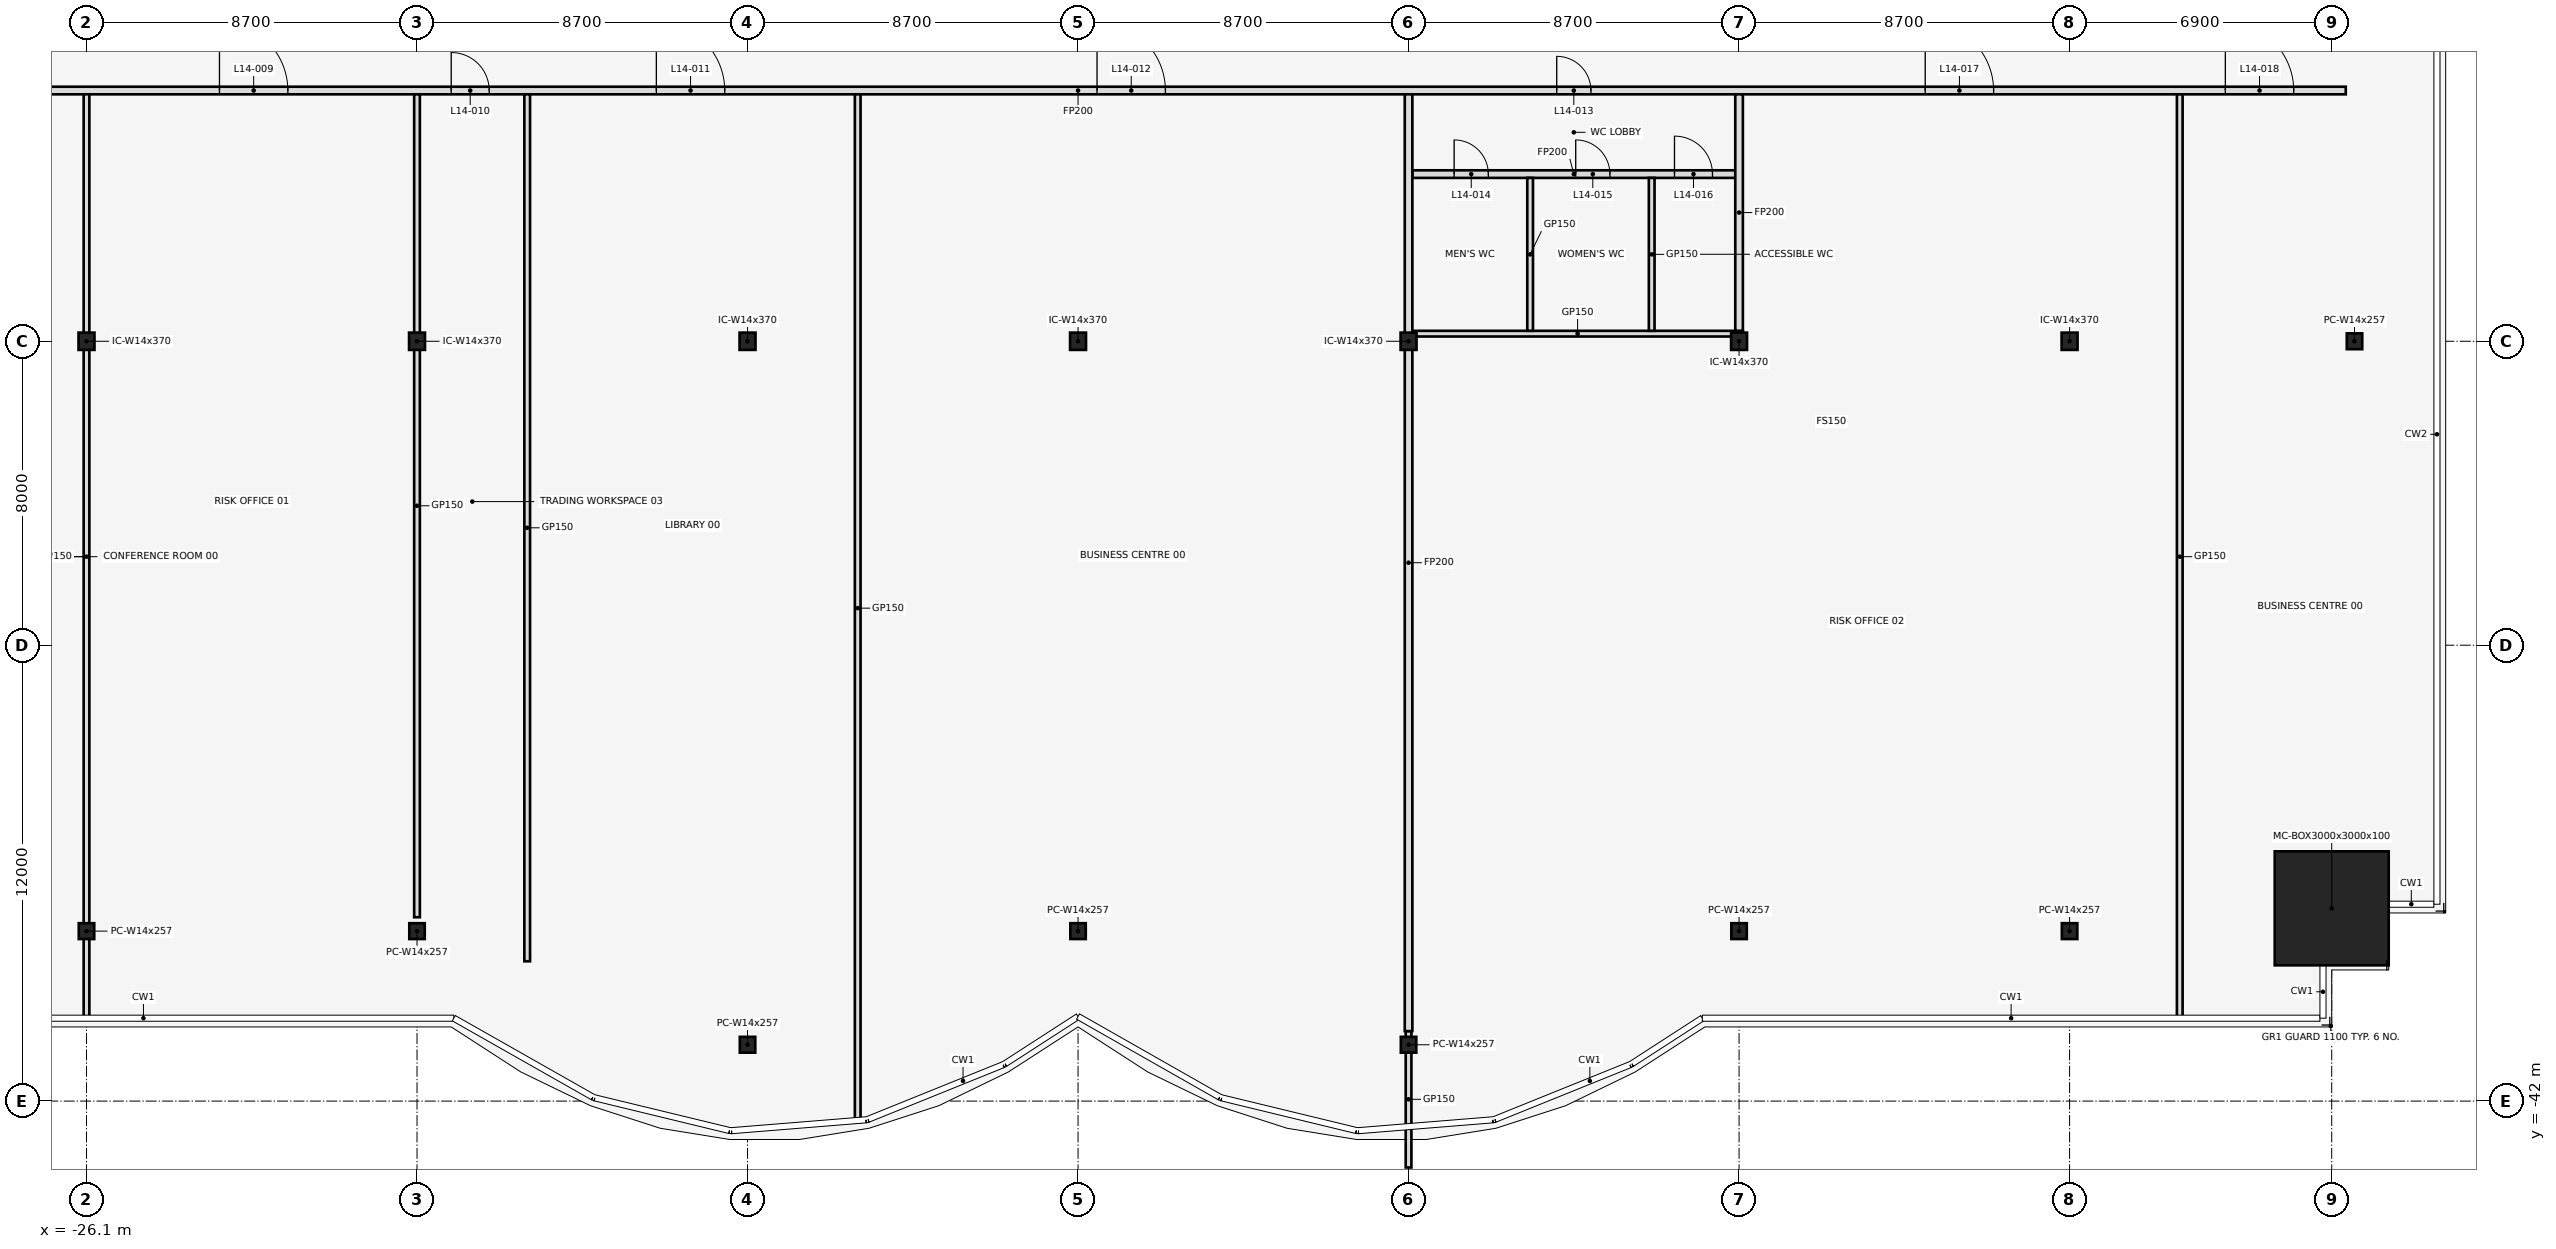
"""IFC4 building model, lengths in metres.
Left out: names, types, materials, properties, quantities, classifications, styles, units other than length and angle.
Written with IfcOpenShell. Run it as: python <this file> out.ifc"""

import sys

from ifc_helpers import new_model, si_unit, direction, frame, frame_2d, origin, origin_2d, place, context, subcontext, project, spatial, rectangle, hollow_rectangle, i_section, extrude, element, fill, save


model = new_model("IFC4")
c1 = context("Model", 3, precision=1e-05, world=origin(), true_north=direction((0.0, 1.0)))
c2 = subcontext(c1, "Body", "Model", "MODEL_VIEW")
j1 = project(units=[si_unit("LENGTHUNIT", "METRE"), si_unit("PLANEANGLEUNIT", "RADIAN")], contexts=[c1])
p1 = place(None, origin())
s1 = spatial("IfcSite", under=j1, at=p1, CompositionType="ELEMENT")
p2 = place(p1, origin())
s2 = spatial("IfcBuilding", under=s1, at=p2, CompositionType="ELEMENT")
p3 = place(p2, frame((0.0, 0.0, 71.0)))
s3 = spatial("IfcBuildingStorey", under=s2, at=p3, CompositionType="ELEMENT", Elevation=71.0)
for number, where, z_axis, x_axis in (
    (1, (-26.1, -37.526, 0.0), (0.0, 0.0, 1.0), (1.0, 0.0, 0.0)),
    (2, (-17.4, -37.526, 0.0), (0.0, 0.0, 1.0), (1.0, 0.0, 0.0)),
    (3, (-8.7, -40.517, 0.0), (0.0, 0.0, 1.0), (1.0, 0.0, 0.0)),
    (4, (0.0, -37.526, 0.0), (0.0, 0.0, 1.0), (1.0, 0.0, 0.0)),
    (5, (8.7, -40.517, 0.0), (0.0, 0.0, 1.0), (1.0, 0.0, 0.0)),
    (6, (17.4, -37.526, 0.0), (0.0, 0.0, 1.0), (1.0, 0.0, 0.0)),
    (7, (26.1, -37.526, 0.0), (0.0, 0.0, 1.0), (1.0, 0.0, 0.0)),
):
    element("IfcColumn", number, at=place(p3, frame(where, z_axis=z_axis, x_axis=x_axis)), inside=s3, PredefinedType="COLUMN", context=c2, shape_type="SweptSolid", body=[
        extrude(i_section(OverallWidth=0.406, OverallDepth=0.417, WebThickness=0.03, FlangeThickness=0.048, at=origin_2d()), origin(), (0.0, 0.0, 1.0), 4.5),
    ])
p4 = place(p3, frame((33.0, -36.926, 0.0), z_axis=(0.0, 0.0, 1.0), x_axis=(1.0, 0.0, 0.0)))
e8 = element("IfcColumn", 8, at=p4, inside=s3, PredefinedType="COLUMN", context=c2, shape_type="SweptSolid", body=[
    extrude(hollow_rectangle(XDim=3.0, YDim=3.0, WallThickness=0.1, at=origin_2d()), origin(), (0.0, 0.0, 1.0), 4.5),
])
p5 = place(p3, frame((33.6, -22.0, 0.0), z_axis=(0.0, 0.0, 1.0), x_axis=(1.0, 0.0, 0.0)))
e9 = element("IfcColumn", 9, at=p5, inside=s3, PredefinedType="COLUMN", context=c2, shape_type="SweptSolid", body=[
    extrude(i_section(OverallWidth=0.406, OverallDepth=0.417, WebThickness=0.03, FlangeThickness=0.048, at=origin_2d()), origin(), (0.0, 0.0, 1.0), 4.5),
])
for number, where, z_axis, x_axis in (
    (10, (-26.1, -22.0, 0.0), (0.0, 0.0, 1.0), (1.0, 0.0, 0.0)),
    (11, (-17.4, -22.0, 0.0), (0.0, 0.0, 1.0), (1.0, 0.0, 0.0)),
    (12, (-8.7, -22.0, 0.0), (0.0, 0.0, 1.0), (1.0, 0.0, 0.0)),
    (13, (0.0, -22.0, 0.0), (0.0, 0.0, 1.0), (1.0, 0.0, 0.0)),
    (14, (8.7, -22.0, 0.0), (0.0, 0.0, 1.0), (1.0, 0.0, 0.0)),
    (15, (17.4, -22.0, 0.0), (0.0, 0.0, 1.0), (1.0, 0.0, 0.0)),
    (16, (26.1, -22.0, 0.0), (0.0, 0.0, 1.0), (1.0, 0.0, 0.0)),
):
    element("IfcColumn", number, at=place(p3, frame(where, z_axis=z_axis, x_axis=x_axis)), inside=s3, PredefinedType="COLUMN", context=c2, shape_type="SweptSolid", body=[
        extrude(i_section(OverallWidth=0.419, OverallDepth=0.455, WebThickness=0.042, FlangeThickness=0.068, at=origin_2d()), origin(), (0.0, 0.0, 1.0), 4.5),
    ])
p6 = place(p3, frame((8.8, -21.8, 0.0), z_axis=(0.0, 0.0, 1.0), x_axis=(1.0, 0.0, 0.0)))
e17 = element("IfcWall", 17, at=p6, inside=s3, PredefinedType="PARTITIONING", context=c2, shape_type="SweptSolid", body=[
    extrude(rectangle(XDim=8.7, YDim=0.15, at=frame_2d((4.35, 0.0))), origin(), (0.0, 0.0, 1.0), 3.418),
])
p7 = place(p3, frame((8.8, -17.6, 0.0), z_axis=(0.0, 0.0, 1.0), x_axis=(1.0, 0.0, 0.0)))
e18 = element("IfcWall", 18, at=p7, inside=s3, PredefinedType="PARTITIONING", context=c2, shape_type="SweptSolid", body=[
    extrude(rectangle(XDim=8.5, YDim=0.2, at=frame_2d((4.25, 0.0))), origin(), (0.0, 0.0, 1.0), 3.418),
])
p8 = place(p7, frame((1.1, 0.0, 0.0)))
e19 = element("IfcOpeningElement", 19, at=p8, cuts=e18, PredefinedType="OPENING", context=c2, shape_type="SweptSolid", body=[
    extrude(rectangle(XDim=0.9, YDim=2.1, at=frame_2d((0.45, 1.05))), frame((0.0, 0.112, 0.0), z_axis=(0.0, -1.0, 0.0), x_axis=(1.0, 0.0, 0.0)), (0.0, 0.0, 1.0), 0.224),
])
p9 = place(p7, frame((4.3, 0.0, 0.0)))
e20 = element("IfcOpeningElement", 20, at=p9, cuts=e18, PredefinedType="OPENING", context=c2, shape_type="SweptSolid", body=[
    extrude(rectangle(XDim=0.9, YDim=2.1, at=frame_2d((0.45, 1.05))), frame((0.0, 0.112, 0.0), z_axis=(0.0, -1.0, 0.0), x_axis=(1.0, 0.0, 0.0)), (0.0, 0.0, 1.0), 0.224),
])
p10 = place(p7, frame((6.9, 0.0, 0.0)))
e21 = element("IfcOpeningElement", 21, at=p10, cuts=e18, PredefinedType="OPENING", context=c2, shape_type="SweptSolid", body=[
    extrude(rectangle(XDim=1.0, YDim=2.1, at=frame_2d((0.5, 1.05))), frame((0.0, 0.112, 0.0), z_axis=(0.0, -1.0, 0.0), x_axis=(1.0, 0.0, 0.0)), (0.0, 0.0, 1.0), 0.224),
])
p11 = place(p3, frame((-33.37, -15.4, 0.0), z_axis=(0.0, 0.0, 1.0), x_axis=(1.0, 0.0, 0.0)))
e22 = element("IfcWall", 22, at=p11, inside=s3, PredefinedType="PARTITIONING", context=c2, shape_type="SweptSolid", body=[
    extrude(rectangle(XDim=66.74, YDim=0.2, at=frame_2d((33.37, 0.0))), origin(), (0.0, 0.0, 1.0), 3.418),
])
p12 = place(p11, frame((1.3, 0.0, 0.0)))
e23 = element("IfcOpeningElement", 23, at=p12, cuts=e22, PredefinedType="OPENING", context=c2, shape_type="SweptSolid", body=[
    extrude(rectangle(XDim=1.8, YDim=2.1, at=frame_2d((0.9, 1.05))), frame((0.0, 0.112, 0.0), z_axis=(0.0, -1.0, 0.0), x_axis=(1.0, 0.0, 0.0)), (0.0, 0.0, 1.0), 0.224),
])
p13 = place(p11, frame((5.27, 0.0, 0.0)))
e24 = element("IfcOpeningElement", 24, at=p13, cuts=e22, PredefinedType="OPENING", context=c2, shape_type="SweptSolid", body=[
    extrude(rectangle(XDim=1.0, YDim=2.1, at=frame_2d((0.5, 1.05))), frame((0.0, 0.112, 0.0), z_axis=(0.0, -1.0, 0.0), x_axis=(1.0, 0.0, 0.0)), (0.0, 0.0, 1.0), 0.224),
])
p14 = place(p11, frame((10.77, 0.0, 0.0)))
e25 = element("IfcOpeningElement", 25, at=p14, cuts=e22, PredefinedType="OPENING", context=c2, shape_type="SweptSolid", body=[
    extrude(rectangle(XDim=1.8, YDim=2.1, at=frame_2d((0.9, 1.05))), frame((0.0, 0.112, 0.0), z_axis=(0.0, -1.0, 0.0), x_axis=(1.0, 0.0, 0.0)), (0.0, 0.0, 1.0), 0.224),
])
p15 = place(p11, frame((16.87, 0.0, 0.0)))
e26 = element("IfcOpeningElement", 26, at=p15, cuts=e22, PredefinedType="OPENING", context=c2, shape_type="SweptSolid", body=[
    extrude(rectangle(XDim=1.0, YDim=2.1, at=frame_2d((0.5, 1.05))), frame((0.0, 0.112, 0.0), z_axis=(0.0, -1.0, 0.0), x_axis=(1.0, 0.0, 0.0)), (0.0, 0.0, 1.0), 0.224),
])
p16 = place(p11, frame((22.27, 0.0, 0.0)))
e27 = element("IfcOpeningElement", 27, at=p16, cuts=e22, PredefinedType="OPENING", context=c2, shape_type="SweptSolid", body=[
    extrude(rectangle(XDim=1.8, YDim=2.1, at=frame_2d((0.9, 1.05))), frame((0.0, 0.112, 0.0), z_axis=(0.0, -1.0, 0.0), x_axis=(1.0, 0.0, 0.0)), (0.0, 0.0, 1.0), 0.224),
])
p17 = place(p11, frame((33.87, 0.0, 0.0)))
e28 = element("IfcOpeningElement", 28, at=p17, cuts=e22, PredefinedType="OPENING", context=c2, shape_type="SweptSolid", body=[
    extrude(rectangle(XDim=1.8, YDim=2.1, at=frame_2d((0.9, 1.05))), frame((0.0, 0.112, 0.0), z_axis=(0.0, -1.0, 0.0), x_axis=(1.0, 0.0, 0.0)), (0.0, 0.0, 1.0), 0.224),
])
p18 = place(p11, frame((45.97, 0.0, 0.0)))
e29 = element("IfcOpeningElement", 29, at=p18, cuts=e22, PredefinedType="OPENING", context=c2, shape_type="SweptSolid", body=[
    extrude(rectangle(XDim=0.9, YDim=2.1, at=frame_2d((0.45, 1.05))), frame((0.0, 0.112, 0.0), z_axis=(0.0, -1.0, 0.0), x_axis=(1.0, 0.0, 0.0)), (0.0, 0.0, 1.0), 0.224),
])
p19 = place(p11, frame((55.67, 0.0, 0.0)))
e30 = element("IfcOpeningElement", 30, at=p19, cuts=e22, PredefinedType="OPENING", context=c2, shape_type="SweptSolid", body=[
    extrude(rectangle(XDim=1.8, YDim=2.1, at=frame_2d((0.9, 1.05))), frame((0.0, 0.112, 0.0), z_axis=(0.0, -1.0, 0.0), x_axis=(1.0, 0.0, 0.0)), (0.0, 0.0, 1.0), 0.224),
])
p20 = place(p11, frame((63.57, 0.0, 0.0)))
e31 = element("IfcOpeningElement", 31, at=p20, cuts=e22, PredefinedType="OPENING", context=c2, shape_type="SweptSolid", body=[
    extrude(rectangle(XDim=1.8, YDim=2.1, at=frame_2d((0.9, 1.05))), frame((0.0, 0.112, 0.0), z_axis=(0.0, -1.0, 0.0), x_axis=(1.0, 0.0, 0.0)), (0.0, 0.0, 1.0), 0.224),
])
p21 = place(p3, frame((-26.1, -39.84, 0.0), z_axis=(0.0, 0.0, 1.0), x_axis=(0.0, 1.0, 0.0)))
e32 = element("IfcWall", 32, at=p21, inside=s3, PredefinedType="PARTITIONING", context=c2, shape_type="SweptSolid", body=[
    extrude(rectangle(XDim=24.34, YDim=0.15, at=frame_2d((12.17, 0.0))), origin(), (0.0, 0.0, 1.0), 3.418),
])
p22 = place(p3, frame((-17.4, -37.16, 0.0), z_axis=(0.0, 0.0, 1.0), x_axis=(0.0, 1.0, 0.0)))
e33 = element("IfcWall", 33, at=p22, inside=s3, PredefinedType="PARTITIONING", context=c2, shape_type="SweptSolid", body=[
    extrude(rectangle(XDim=21.66, YDim=0.15, at=frame_2d((10.83, 0.0))), origin(), (0.0, 0.0, 1.0), 3.418),
])
p23 = place(p3, frame((-14.5, -38.32, 0.0), z_axis=(0.0, 0.0, 1.0), x_axis=(0.0, 1.0, 0.0)))
e34 = element("IfcWall", 34, at=p23, inside=s3, PredefinedType="PARTITIONING", context=c2, shape_type="SweptSolid", body=[
    extrude(rectangle(XDim=22.82, YDim=0.15, at=frame_2d((11.41, 0.0))), origin(), (0.0, 0.0, 1.0), 3.418),
])
p24 = place(p3, frame((-5.8, -42.55, 0.0), z_axis=(0.0, 0.0, 1.0), x_axis=(0.0, 1.0, 0.0)))
e35 = element("IfcWall", 35, at=p24, inside=s3, PredefinedType="PARTITIONING", context=c2, shape_type="SweptSolid", body=[
    extrude(rectangle(XDim=27.05, YDim=0.15, at=frame_2d((13.525, 0.0))), origin(), (0.0, 0.0, 1.0), 3.418),
])
p25 = place(p3, frame((8.7, -43.748, 0.0), z_axis=(0.0, 0.0, 1.0), x_axis=(0.0, 1.0, 0.0)))
e36 = element("IfcWall", 36, at=p25, inside=s3, PredefinedType="PARTITIONING", context=c2, shape_type="SweptSolid", body=[
    extrude(rectangle(XDim=3.59, YDim=0.15, at=frame_2d((1.795, 0.0))), origin(), (0.0, 0.0, 1.0), 3.418),
])
p26 = place(p3, frame((8.7, -40.158, 0.0), z_axis=(0.0, 0.0, 1.0), x_axis=(0.0, 1.0, 0.0)))
e37 = element("IfcWall", 37, at=p26, inside=s3, PredefinedType="PARTITIONING", context=c2, shape_type="SweptSolid", body=[
    extrude(rectangle(XDim=24.658, YDim=0.2, at=frame_2d((12.329, 0.0))), origin(), (0.0, 0.0, 1.0), 3.418),
])
for number, where, z_axis, x_axis in (
    (38, (11.9, -21.725, 0.0), (0.0, 0.0, 1.0), (0.0, 1.0, 0.0)),
    (39, (15.1, -21.725, 0.0), (0.0, 0.0, 1.0), (0.0, 1.0, 0.0)),
):
    element("IfcWall", number, at=place(p3, frame(where, z_axis=z_axis, x_axis=x_axis)), inside=s3, PredefinedType="PARTITIONING", context=c2, shape_type="SweptSolid", body=[
        extrude(rectangle(XDim=4.025, YDim=0.15, at=frame_2d((2.013, 0.0))), origin(), (0.0, 0.0, 1.0), 3.418),
    ])
p27 = place(p3, frame((17.4, -21.725, 0.0), z_axis=(0.0, 0.0, 1.0), x_axis=(0.0, 1.0, 0.0)))
e40 = element("IfcWall", 40, at=p27, inside=s3, PredefinedType="PARTITIONING", context=c2, shape_type="SweptSolid", body=[
    extrude(rectangle(XDim=6.225, YDim=0.2, at=frame_2d((3.113, 0.0))), origin(), (0.0, 0.0, 1.0), 3.418),
])
p28 = place(p3, frame((29.0, -39.84, 0.0), z_axis=(0.0, 0.0, 1.0), x_axis=(0.0, 1.0, 0.0)))
e41 = element("IfcWall", 41, at=p28, inside=s3, PredefinedType="PARTITIONING", context=c2, shape_type="SweptSolid", body=[
    extrude(rectangle(XDim=24.34, YDim=0.15, at=frame_2d((12.17, 0.0))), origin(), (0.0, 0.0, 1.0), 3.418),
])
p29 = place(p14, origin())
e42 = element("IfcDoor", 42, at=p29, inside=s3, OperationType="SINGLE_SWING_LEFT", PredefinedType="DOOR", context=c2, shape_type="SweptSolid", body=[
    extrude(rectangle(XDim=1.8, YDim=2.1, at=frame_2d((0.9, 1.05))), frame((0.0, 0.025, 0.0), z_axis=(0.0, -1.0, 0.0), x_axis=(1.0, 0.0, 0.0)), (0.0, 0.0, 1.0), 0.05),
])
fill(e25, e42)
p30 = place(p15, frame((1.0, 0.0, 0.0), z_axis=(0.0, 0.0, 1.0), x_axis=(-1.0, 0.0, 0.0)))
e43 = element("IfcDoor", 43, at=p30, inside=s3, OperationType="SINGLE_SWING_LEFT", PredefinedType="DOOR", context=c2, shape_type="SweptSolid", body=[
    extrude(rectangle(XDim=1.0, YDim=2.1, at=frame_2d((0.5, 1.05))), frame((0.0, 0.025, 0.0), z_axis=(0.0, -1.0, 0.0), x_axis=(1.0, 0.0, 0.0)), (0.0, 0.0, 1.0), 0.05),
])
fill(e26, e43)
p31 = place(p16, origin())
e44 = element("IfcDoor", 44, at=p31, inside=s3, OperationType="SINGLE_SWING_LEFT", PredefinedType="DOOR", context=c2, shape_type="SweptSolid", body=[
    extrude(rectangle(XDim=1.8, YDim=2.1, at=frame_2d((0.9, 1.05))), frame((0.0, 0.025, 0.0), z_axis=(0.0, -1.0, 0.0), x_axis=(1.0, 0.0, 0.0)), (0.0, 0.0, 1.0), 0.05),
])
fill(e27, e44)
p32 = place(p17, origin())
e45 = element("IfcDoor", 45, at=p32, inside=s3, OperationType="SINGLE_SWING_LEFT", PredefinedType="DOOR", context=c2, shape_type="SweptSolid", body=[
    extrude(rectangle(XDim=1.8, YDim=2.1, at=frame_2d((0.9, 1.05))), frame((0.0, 0.025, 0.0), z_axis=(0.0, -1.0, 0.0), x_axis=(1.0, 0.0, 0.0)), (0.0, 0.0, 1.0), 0.05),
])
fill(e28, e45)
p33 = place(p18, frame((0.9, 0.0, 0.0), z_axis=(0.0, 0.0, 1.0), x_axis=(-1.0, 0.0, 0.0)))
e46 = element("IfcDoor", 46, at=p33, inside=s3, OperationType="SINGLE_SWING_LEFT", PredefinedType="DOOR", context=c2, shape_type="SweptSolid", body=[
    extrude(rectangle(XDim=0.9, YDim=2.1, at=frame_2d((0.45, 1.05))), frame((0.0, 0.025, 0.0), z_axis=(0.0, -1.0, 0.0), x_axis=(1.0, 0.0, 0.0)), (0.0, 0.0, 1.0), 0.05),
])
fill(e29, e46)
p34 = place(p8, frame((0.9, 0.0, 0.0), z_axis=(0.0, 0.0, 1.0), x_axis=(-1.0, 0.0, 0.0)))
e47 = element("IfcDoor", 47, at=p34, inside=s3, OperationType="SINGLE_SWING_RIGHT", PredefinedType="DOOR", context=c2, shape_type="SweptSolid", body=[
    extrude(rectangle(XDim=0.9, YDim=2.1, at=frame_2d((0.45, 1.05))), frame((0.0, 0.025, 0.0), z_axis=(0.0, -1.0, 0.0), x_axis=(1.0, 0.0, 0.0)), (0.0, 0.0, 1.0), 0.05),
])
fill(e19, e47)
p35 = place(p9, frame((0.9, 0.0, 0.0), z_axis=(0.0, 0.0, 1.0), x_axis=(-1.0, 0.0, 0.0)))
e48 = element("IfcDoor", 48, at=p35, inside=s3, OperationType="SINGLE_SWING_RIGHT", PredefinedType="DOOR", context=c2, shape_type="SweptSolid", body=[
    extrude(rectangle(XDim=0.9, YDim=2.1, at=frame_2d((0.45, 1.05))), frame((0.0, 0.025, 0.0), z_axis=(0.0, -1.0, 0.0), x_axis=(1.0, 0.0, 0.0)), (0.0, 0.0, 1.0), 0.05),
])
fill(e20, e48)
p36 = place(p10, frame((1.0, 0.0, 0.0), z_axis=(0.0, 0.0, 1.0), x_axis=(-1.0, 0.0, 0.0)))
e49 = element("IfcDoor", 49, at=p36, inside=s3, OperationType="SINGLE_SWING_LEFT", PredefinedType="DOOR", context=c2, shape_type="SweptSolid", body=[
    extrude(rectangle(XDim=1.0, YDim=2.1, at=frame_2d((0.5, 1.05))), frame((0.0, 0.025, 0.0), z_axis=(0.0, -1.0, 0.0), x_axis=(1.0, 0.0, 0.0)), (0.0, 0.0, 1.0), 0.05),
])
fill(e21, e49)
p37 = place(p19, origin())
e50 = element("IfcDoor", 50, at=p37, inside=s3, OperationType="SINGLE_SWING_LEFT", PredefinedType="DOOR", context=c2, shape_type="SweptSolid", body=[
    extrude(rectangle(XDim=1.8, YDim=2.1, at=frame_2d((0.9, 1.05))), frame((0.0, 0.025, 0.0), z_axis=(0.0, -1.0, 0.0), x_axis=(1.0, 0.0, 0.0)), (0.0, 0.0, 1.0), 0.05),
])
fill(e30, e50)
p38 = place(p20, origin())
e51 = element("IfcDoor", 51, at=p38, inside=s3, OperationType="SINGLE_SWING_LEFT", PredefinedType="DOOR", context=c2, shape_type="SweptSolid", body=[
    extrude(rectangle(XDim=1.8, YDim=2.1, at=frame_2d((0.9, 1.05))), frame((0.0, 0.025, 0.0), z_axis=(0.0, -1.0, 0.0), x_axis=(1.0, 0.0, 0.0)), (0.0, 0.0, 1.0), 0.05),
])
fill(e31, e51)
save(model, sys.argv[1])
